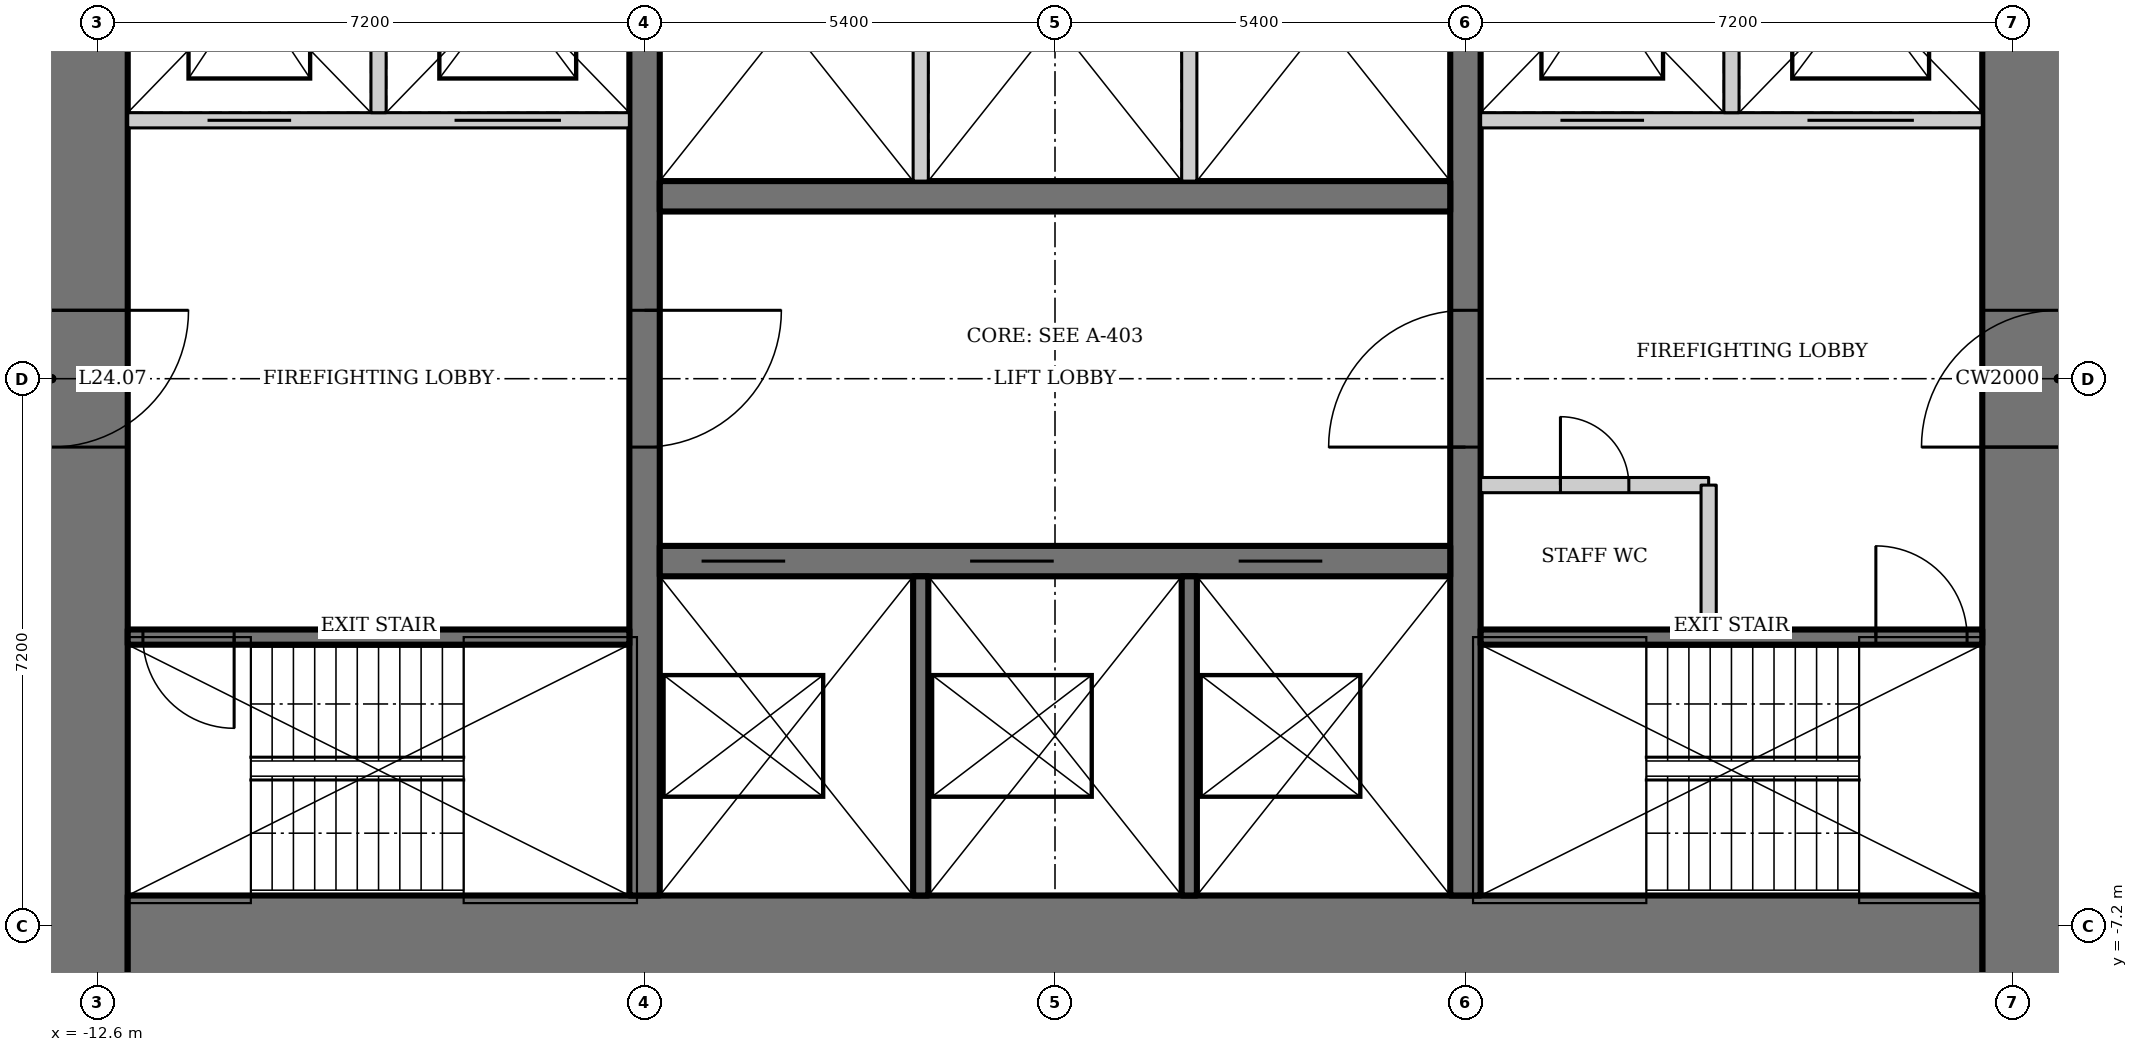
"""IFC4 building model, lengths in metres.
Left out: names, types, materials, properties, quantities, classifications, styles, units other than length and angle.
Written with IfcOpenShell. Run it as: python <this file> out.ifc"""

import sys

from ifc_helpers import new_model, si_unit, direction, frame, frame_2d, origin, place, context, subcontext, project, spatial, rectangle, extrude, element, fill, save


model = new_model("IFC4")
c1 = context("Model", 3, precision=1e-05, world=origin(), true_north=direction((0.0, 1.0)))
c2 = subcontext(c1, "Body", "Model", "MODEL_VIEW")
j1 = project(units=[si_unit("LENGTHUNIT", "METRE"), si_unit("PLANEANGLEUNIT", "RADIAN")], contexts=[c1])
p1 = place(None, origin())
s1 = spatial("IfcSite", under=j1, at=p1, CompositionType="ELEMENT")
p2 = place(p1, origin())
s2 = spatial("IfcBuilding", under=s1, at=p2, CompositionType="ELEMENT")
p3 = place(p2, frame((0.0, 0.0, 101.8)))
s3 = spatial("IfcBuildingStorey", under=s2, at=p3, CompositionType="ELEMENT", Elevation=101.8)
p4 = place(p3, frame((13.2, -13.0, 0.0), z_axis=(0.0, 0.0, 1.0), x_axis=(0.0, 1.0, 0.0)))
e1 = element("IfcWall", 1, at=p4, inside=s3, PredefinedType="SHEAR", context=c2, shape_type="SweptSolid", body=[
    extrude(rectangle(XDim=26.0, YDim=2.0, at=frame_2d((13.0, 0.0))), origin(), (0.0, 0.0, 1.0), 3.6),
])
p5 = place(p4, frame((12.1, 0.0, 0.0)))
e2 = element("IfcOpeningElement", 2, at=p5, cuts=e1, PredefinedType="OPENING", context=c2, shape_type="SweptSolid", body=[
    extrude(rectangle(XDim=1.8, YDim=2.1, at=frame_2d((0.9, 1.05))), frame((0.0, 1.01, 0.0), z_axis=(0.0, -1.0, 0.0), x_axis=(1.0, 0.0, 0.0)), (0.0, 0.0, 1.0), 2.02),
])
p6 = place(p3, frame((-13.2, 13.0, 0.0), z_axis=(0.0, 0.0, 1.0), x_axis=(0.0, -1.0, 0.0)))
e3 = element("IfcWall", 3, at=p6, inside=s3, PredefinedType="SHEAR", context=c2, shape_type="SweptSolid", body=[
    extrude(rectangle(XDim=26.0, YDim=2.0, at=frame_2d((13.0, 0.0))), origin(), (0.0, 0.0, 1.0), 3.6),
])
p7 = place(p6, frame((12.1, 0.0, 0.0)))
e4 = element("IfcOpeningElement", 4, at=p7, cuts=e3, PredefinedType="OPENING", context=c2, shape_type="SweptSolid", body=[
    extrude(rectangle(XDim=1.8, YDim=2.1, at=frame_2d((0.9, 1.05))), frame((0.0, 1.01, 0.0), z_axis=(0.0, -1.0, 0.0), x_axis=(1.0, 0.0, 0.0)), (0.0, 0.0, 1.0), 2.02),
])
p8 = place(p3, frame((-12.2, -8.0, 0.0), z_axis=(0.0, 0.0, 1.0), x_axis=(1.0, 0.0, 0.0)))
e5 = element("IfcWall", 5, at=p8, inside=s3, PredefinedType="SHEAR", context=c2, shape_type="SweptSolid", body=[
    extrude(rectangle(XDim=24.4, YDim=2.4, at=frame_2d((12.2, 0.0))), origin(), (0.0, 0.0, 1.0), 3.6),
])
p9 = place(p3, frame((5.4, -6.8, 0.0), z_axis=(0.0, 0.0, 1.0), x_axis=(0.0, 1.0, 0.0)))
e6 = element("IfcWall", 6, at=p9, inside=s3, PredefinedType="SHEAR", context=c2, shape_type="SweptSolid", body=[
    extrude(rectangle(XDim=13.6, YDim=0.4, at=frame_2d((6.8, 0.0))), origin(), (0.0, 0.0, 1.0), 3.6),
])
p10 = place(p9, frame((5.9, 0.0, 0.0)))
e7 = element("IfcOpeningElement", 7, at=p10, cuts=e6, PredefinedType="OPENING", context=c2, shape_type="SweptSolid", body=[
    extrude(rectangle(XDim=1.8, YDim=2.1, at=frame_2d((0.9, 1.05))), frame((0.0, 0.21, 0.0), z_axis=(0.0, -1.0, 0.0), x_axis=(1.0, 0.0, 0.0)), (0.0, 0.0, 1.0), 0.42),
])
p11 = place(p3, frame((-5.4, 6.8, 0.0), z_axis=(0.0, 0.0, 1.0), x_axis=(0.0, -1.0, 0.0)))
e8 = element("IfcWall", 8, at=p11, inside=s3, PredefinedType="SHEAR", context=c2, shape_type="SweptSolid", body=[
    extrude(rectangle(XDim=13.6, YDim=0.4, at=frame_2d((6.8, 0.0))), origin(), (0.0, 0.0, 1.0), 3.6),
])
p12 = place(p11, frame((5.9, 0.0, 0.0)))
e9 = element("IfcOpeningElement", 9, at=p12, cuts=e8, PredefinedType="OPENING", context=c2, shape_type="SweptSolid", body=[
    extrude(rectangle(XDim=1.8, YDim=2.1, at=frame_2d((0.9, 1.05))), frame((0.0, 0.21, 0.0), z_axis=(0.0, -1.0, 0.0), x_axis=(1.0, 0.0, 0.0)), (0.0, 0.0, 1.0), 0.42),
])
p13 = place(p3, frame((-5.2, -2.4, 0.0), z_axis=(0.0, 0.0, 1.0), x_axis=(1.0, 0.0, 0.0)))
e10 = element("IfcWall", 10, at=p13, inside=s3, PredefinedType="SHEAR", context=c2, shape_type="SweptSolid", body=[
    extrude(rectangle(XDim=10.4, YDim=0.4, at=frame_2d((5.2, 0.0))), origin(), (0.0, 0.0, 1.0), 3.6),
])
p14 = place(p13, frame((0.55, 0.0, 0.0)))
e11 = element("IfcOpeningElement", 11, at=p14, cuts=e10, PredefinedType="OPENING", context=c2, shape_type="SweptSolid", body=[
    extrude(rectangle(XDim=1.1, YDim=2.2, at=frame_2d((0.55, 1.1))), frame((0.0, 0.21, 0.0), z_axis=(0.0, -1.0, 0.0), x_axis=(1.0, 0.0, 0.0)), (0.0, 0.0, 1.0), 0.42),
])
p15 = place(p13, frame((4.083, 0.0, 0.0)))
e12 = element("IfcOpeningElement", 12, at=p15, cuts=e10, PredefinedType="OPENING", context=c2, shape_type="SweptSolid", body=[
    extrude(rectangle(XDim=1.1, YDim=2.2, at=frame_2d((0.55, 1.1))), frame((0.0, 0.21, 0.0), z_axis=(0.0, -1.0, 0.0), x_axis=(1.0, 0.0, 0.0)), (0.0, 0.0, 1.0), 0.42),
])
p16 = place(p13, frame((7.617, 0.0, 0.0)))
e13 = element("IfcOpeningElement", 13, at=p16, cuts=e10, PredefinedType="OPENING", context=c2, shape_type="SweptSolid", body=[
    extrude(rectangle(XDim=1.1, YDim=2.2, at=frame_2d((0.55, 1.1))), frame((0.0, 0.21, 0.0), z_axis=(0.0, -1.0, 0.0), x_axis=(1.0, 0.0, 0.0)), (0.0, 0.0, 1.0), 0.42),
])
for number, where, z_axis, x_axis in (
    (14, (-1.767, -2.6, 0.0), (0.0, 0.0, 1.0), (0.0, -1.0, 0.0)),
    (15, (1.767, -2.6, 0.0), (0.0, 0.0, 1.0), (0.0, -1.0, 0.0)),
):
    element("IfcWall", number, at=place(p3, frame(where, z_axis=z_axis, x_axis=x_axis)), inside=s3, PredefinedType="SOLIDWALL", context=c2, shape_type="SweptSolid", body=[
        extrude(rectangle(XDim=4.2, YDim=0.2, at=frame_2d((2.1, 0.0))), origin(), (0.0, 0.0, 1.0), 3.6),
    ])
p17 = place(p3, frame((5.2, 2.4, 0.0), z_axis=(0.0, 0.0, 1.0), x_axis=(-1.0, 0.0, 0.0)))
e16 = element("IfcWall", 16, at=p17, inside=s3, PredefinedType="SHEAR", context=c2, shape_type="SweptSolid", body=[
    extrude(rectangle(XDim=10.4, YDim=0.4, at=frame_2d((5.2, 0.0))), origin(), (0.0, 0.0, 1.0), 3.6),
])
for number, where, z_axis, x_axis in (
    (17, (-1.767, 2.6, 0.0), (0.0, 0.0, 1.0), (0.0, 1.0, 0.0)),
    (18, (1.767, 2.6, 0.0), (0.0, 0.0, 1.0), (0.0, 1.0, 0.0)),
):
    element("IfcWall", number, at=place(p3, frame(where, z_axis=z_axis, x_axis=x_axis)), inside=s3, PredefinedType="SOLIDWALL", context=c2, shape_type="SweptSolid", body=[
        extrude(rectangle(XDim=4.2, YDim=0.2, at=frame_2d((2.1, 0.0))), origin(), (0.0, 0.0, 1.0), 3.6),
    ])
p18 = place(p3, frame((5.6, -3.4, 0.0), z_axis=(0.0, 0.0, 1.0), x_axis=(1.0, 0.0, 0.0)))
e19 = element("IfcWall", 19, at=p18, inside=s3, PredefinedType="SHEAR", context=c2, shape_type="SweptSolid", body=[
    extrude(rectangle(XDim=6.6, YDim=0.2, at=frame_2d((3.3, 0.0))), origin(), (0.0, 0.0, 1.0), 3.6),
])
p19 = place(p18, frame((5.2, 0.0, 0.0)))
e20 = element("IfcOpeningElement", 20, at=p19, cuts=e19, PredefinedType="OPENING", context=c2, shape_type="SweptSolid", body=[
    extrude(rectangle(XDim=1.2, YDim=2.1, at=frame_2d((0.6, 1.05))), frame((0.0, 0.11, 0.0), z_axis=(0.0, -1.0, 0.0), x_axis=(1.0, 0.0, 0.0)), (0.0, 0.0, 1.0), 0.22),
])
p20 = place(p3, frame((12.2, 3.4, 0.0), z_axis=(0.0, 0.0, 1.0), x_axis=(-1.0, 0.0, 0.0)))
e21 = element("IfcWall", 21, at=p20, inside=s3, PredefinedType="SOLIDWALL", context=c2, shape_type="SweptSolid", body=[
    extrude(rectangle(XDim=6.6, YDim=0.2, at=frame_2d((3.3, 0.0))), origin(), (0.0, 0.0, 1.0), 3.6),
])
p21 = place(p20, frame((4.45, 0.0, 0.0)))
e22 = element("IfcOpeningElement", 22, at=p21, cuts=e21, PredefinedType="OPENING", context=c2, shape_type="SweptSolid", body=[
    extrude(rectangle(XDim=1.1, YDim=2.2, at=frame_2d((0.55, 1.1))), frame((0.0, 0.11, 0.0), z_axis=(0.0, -1.0, 0.0), x_axis=(1.0, 0.0, 0.0)), (0.0, 0.0, 1.0), 0.22),
])
p22 = place(p20, frame((0.9, 0.0, 0.0)))
e23 = element("IfcOpeningElement", 23, at=p22, cuts=e21, PredefinedType="OPENING", context=c2, shape_type="SweptSolid", body=[
    extrude(rectangle(XDim=1.4, YDim=2.2, at=frame_2d((0.7, 1.1))), frame((0.0, 0.11, 0.0), z_axis=(0.0, -1.0, 0.0), x_axis=(1.0, 0.0, 0.0)), (0.0, 0.0, 1.0), 0.22),
])
p23 = place(p3, frame((8.9, 3.5, 0.0), z_axis=(0.0, 0.0, 1.0), x_axis=(0.0, 1.0, 0.0)))
e24 = element("IfcWall", 24, at=p23, inside=s3, PredefinedType="SOLIDWALL", context=c2, shape_type="SweptSolid", body=[
    extrude(rectangle(XDim=3.3, YDim=0.2, at=frame_2d((1.65, 0.0))), origin(), (0.0, 0.0, 1.0), 3.6),
])
p24 = place(p3, frame((-5.6, -3.4, 0.0), z_axis=(0.0, 0.0, 1.0), x_axis=(-1.0, 0.0, 0.0)))
e25 = element("IfcWall", 25, at=p24, inside=s3, PredefinedType="SHEAR", context=c2, shape_type="SweptSolid", body=[
    extrude(rectangle(XDim=6.6, YDim=0.2, at=frame_2d((3.3, 0.0))), origin(), (0.0, 0.0, 1.0), 3.6),
])
p25 = place(p24, frame((5.2, 0.0, 0.0)))
e26 = element("IfcOpeningElement", 26, at=p25, cuts=e25, PredefinedType="OPENING", context=c2, shape_type="SweptSolid", body=[
    extrude(rectangle(XDim=1.2, YDim=2.1, at=frame_2d((0.6, 1.05))), frame((0.0, 0.11, 0.0), z_axis=(0.0, -1.0, 0.0), x_axis=(1.0, 0.0, 0.0)), (0.0, 0.0, 1.0), 0.22),
])
p26 = place(p3, frame((-12.2, 3.4, 0.0), z_axis=(0.0, 0.0, 1.0), x_axis=(1.0, 0.0, 0.0)))
e27 = element("IfcWall", 27, at=p26, inside=s3, PredefinedType="SOLIDWALL", context=c2, shape_type="SweptSolid", body=[
    extrude(rectangle(XDim=6.6, YDim=0.2, at=frame_2d((3.3, 0.0))), origin(), (0.0, 0.0, 1.0), 3.6),
])
p27 = place(p26, frame((1.05, 0.0, 0.0)))
e28 = element("IfcOpeningElement", 28, at=p27, cuts=e27, PredefinedType="OPENING", context=c2, shape_type="SweptSolid", body=[
    extrude(rectangle(XDim=1.1, YDim=2.2, at=frame_2d((0.55, 1.1))), frame((0.0, 0.11, 0.0), z_axis=(0.0, -1.0, 0.0), x_axis=(1.0, 0.0, 0.0)), (0.0, 0.0, 1.0), 0.22),
])
p28 = place(p26, frame((4.3, 0.0, 0.0)))
e29 = element("IfcOpeningElement", 29, at=p28, cuts=e27, PredefinedType="OPENING", context=c2, shape_type="SweptSolid", body=[
    extrude(rectangle(XDim=1.4, YDim=2.2, at=frame_2d((0.7, 1.1))), frame((0.0, 0.11, 0.0), z_axis=(0.0, -1.0, 0.0), x_axis=(1.0, 0.0, 0.0)), (0.0, 0.0, 1.0), 0.22),
])
p29 = place(p3, frame((-8.9, 3.5, 0.0), z_axis=(0.0, 0.0, 1.0), x_axis=(0.0, 1.0, 0.0)))
e30 = element("IfcWall", 30, at=p29, inside=s3, PredefinedType="SOLIDWALL", context=c2, shape_type="SweptSolid", body=[
    extrude(rectangle(XDim=3.3, YDim=0.2, at=frame_2d((1.65, 0.0))), origin(), (0.0, 0.0, 1.0), 3.6),
])
p30 = place(p3, frame((5.6, -1.4, 0.0), z_axis=(0.0, 0.0, 1.0), x_axis=(1.0, 0.0, 0.0)))
e31 = element("IfcWall", 31, at=p30, inside=s3, PredefinedType="SOLIDWALL", context=c2, shape_type="SweptSolid", body=[
    extrude(rectangle(XDim=3.0, YDim=0.2, at=frame_2d((1.5, 0.0))), origin(), (0.0, 0.0, 1.0), 3.4),
])
p31 = place(p30, frame((1.05, 0.0, 0.0)))
e32 = element("IfcOpeningElement", 32, at=p31, cuts=e31, PredefinedType="OPENING", context=c2, shape_type="SweptSolid", body=[
    extrude(rectangle(XDim=0.9, YDim=2.1, at=frame_2d((0.45, 1.05))), frame((0.0, 0.11, 0.0), z_axis=(0.0, -1.0, 0.0), x_axis=(1.0, 0.0, 0.0)), (0.0, 0.0, 1.0), 0.22),
])
p32 = place(p3, frame((8.6, -1.4, 0.0), z_axis=(0.0, 0.0, 1.0), x_axis=(0.0, -1.0, 0.0)))
e33 = element("IfcWall", 33, at=p32, inside=s3, PredefinedType="SOLIDWALL", context=c2, shape_type="SweptSolid", body=[
    extrude(rectangle(XDim=1.9, YDim=0.2, at=frame_2d((0.95, 0.0))), origin(), (0.0, 0.0, 1.0), 3.4),
])
p33 = place(p31, origin())
e34 = element("IfcDoor", 34, at=p33, inside=s3, OperationType="SINGLE_SWING_LEFT", PredefinedType="DOOR", context=c2, shape_type="SweptSolid", body=[
    extrude(rectangle(XDim=0.9, YDim=2.1, at=frame_2d((0.45, 1.05))), frame((0.0, 0.025, 0.0), z_axis=(0.0, -1.0, 0.0), x_axis=(1.0, 0.0, 0.0)), (0.0, 0.0, 1.0), 0.05),
])
fill(e32, e34)
p34 = place(p10, origin())
e35 = element("IfcDoor", 35, at=p34, inside=s3, OperationType="DOUBLE_DOOR_DOUBLE_SWING", PredefinedType="DOOR", context=c2, shape_type="SweptSolid", body=[
    extrude(rectangle(XDim=1.8, YDim=2.1, at=frame_2d((0.9, 1.05))), frame((0.0, 0.025, 0.0), z_axis=(0.0, -1.0, 0.0), x_axis=(1.0, 0.0, 0.0)), (0.0, 0.0, 1.0), 0.05),
])
fill(e7, e35)
p35 = place(p12, origin())
e36 = element("IfcDoor", 36, at=p35, inside=s3, OperationType="DOUBLE_DOOR_DOUBLE_SWING", PredefinedType="DOOR", context=c2, shape_type="SweptSolid", body=[
    extrude(rectangle(XDim=1.8, YDim=2.1, at=frame_2d((0.9, 1.05))), frame((0.0, 0.025, 0.0), z_axis=(0.0, -1.0, 0.0), x_axis=(1.0, 0.0, 0.0)), (0.0, 0.0, 1.0), 0.05),
])
fill(e9, e36)
p36 = place(p19, origin())
e37 = element("IfcDoor", 37, at=p36, inside=s3, OperationType="SINGLE_SWING_RIGHT", PredefinedType="DOOR", context=c2, shape_type="SweptSolid", body=[
    extrude(rectangle(XDim=1.2, YDim=2.1, at=frame_2d((0.6, 1.05))), frame((0.0, 0.025, 0.0), z_axis=(0.0, -1.0, 0.0), x_axis=(1.0, 0.0, 0.0)), (0.0, 0.0, 1.0), 0.05),
])
fill(e20, e37)
p37 = place(p25, origin())
e38 = element("IfcDoor", 38, at=p37, inside=s3, OperationType="SINGLE_SWING_RIGHT", PredefinedType="DOOR", context=c2, shape_type="SweptSolid", body=[
    extrude(rectangle(XDim=1.2, YDim=2.1, at=frame_2d((0.6, 1.05))), frame((0.0, 0.025, 0.0), z_axis=(0.0, -1.0, 0.0), x_axis=(1.0, 0.0, 0.0)), (0.0, 0.0, 1.0), 0.05),
])
fill(e26, e38)
p38 = place(p5, origin())
e39 = element("IfcDoor", 39, at=p38, inside=s3, OperationType="DOUBLE_DOOR_DOUBLE_SWING", PredefinedType="DOOR", context=c2, shape_type="SweptSolid", body=[
    extrude(rectangle(XDim=1.8, YDim=2.1, at=frame_2d((0.9, 1.05))), frame((0.0, 0.025, 0.0), z_axis=(0.0, -1.0, 0.0), x_axis=(1.0, 0.0, 0.0)), (0.0, 0.0, 1.0), 0.05),
])
fill(e2, e39)
p39 = place(p7, origin())
e40 = element("IfcDoor", 40, at=p39, inside=s3, OperationType="DOUBLE_DOOR_DOUBLE_SWING", PredefinedType="DOOR", context=c2, shape_type="SweptSolid", body=[
    extrude(rectangle(XDim=1.8, YDim=2.1, at=frame_2d((0.9, 1.05))), frame((0.0, 0.025, 0.0), z_axis=(0.0, -1.0, 0.0), x_axis=(1.0, 0.0, 0.0)), (0.0, 0.0, 1.0), 0.05),
])
fill(e4, e40)
p40 = place(p14, origin())
e41 = element("IfcDoor", 41, at=p40, inside=s3, OperationType="DOUBLE_DOOR_SLIDING", PredefinedType="DOOR", context=c2, shape_type="SweptSolid", body=[
    extrude(rectangle(XDim=1.1, YDim=2.2, at=frame_2d((0.55, 1.1))), frame((0.0, 0.025, 0.0), z_axis=(0.0, -1.0, 0.0), x_axis=(1.0, 0.0, 0.0)), (0.0, 0.0, 1.0), 0.05),
])
fill(e11, e41)
p41 = place(p15, origin())
e42 = element("IfcDoor", 42, at=p41, inside=s3, OperationType="DOUBLE_DOOR_SLIDING", PredefinedType="DOOR", context=c2, shape_type="SweptSolid", body=[
    extrude(rectangle(XDim=1.1, YDim=2.2, at=frame_2d((0.55, 1.1))), frame((0.0, 0.025, 0.0), z_axis=(0.0, -1.0, 0.0), x_axis=(1.0, 0.0, 0.0)), (0.0, 0.0, 1.0), 0.05),
])
fill(e12, e42)
p42 = place(p16, origin())
e43 = element("IfcDoor", 43, at=p42, inside=s3, OperationType="DOUBLE_DOOR_SLIDING", PredefinedType="DOOR", context=c2, shape_type="SweptSolid", body=[
    extrude(rectangle(XDim=1.1, YDim=2.2, at=frame_2d((0.55, 1.1))), frame((0.0, 0.025, 0.0), z_axis=(0.0, -1.0, 0.0), x_axis=(1.0, 0.0, 0.0)), (0.0, 0.0, 1.0), 0.05),
])
fill(e13, e43)
p43 = place(p27, origin())
e44 = element("IfcDoor", 44, at=p43, inside=s3, OperationType="DOUBLE_DOOR_SLIDING", PredefinedType="DOOR", context=c2, shape_type="SweptSolid", body=[
    extrude(rectangle(XDim=1.1, YDim=2.2, at=frame_2d((0.55, 1.1))), frame((0.0, 0.025, 0.0), z_axis=(0.0, -1.0, 0.0), x_axis=(1.0, 0.0, 0.0)), (0.0, 0.0, 1.0), 0.05),
])
fill(e28, e44)
p44 = place(p28, origin())
e45 = element("IfcDoor", 45, at=p44, inside=s3, OperationType="DOUBLE_DOOR_SLIDING", PredefinedType="DOOR", context=c2, shape_type="SweptSolid", body=[
    extrude(rectangle(XDim=1.4, YDim=2.2, at=frame_2d((0.7, 1.1))), frame((0.0, 0.025, 0.0), z_axis=(0.0, -1.0, 0.0), x_axis=(1.0, 0.0, 0.0)), (0.0, 0.0, 1.0), 0.05),
])
fill(e29, e45)
p45 = place(p21, origin())
e46 = element("IfcDoor", 46, at=p45, inside=s3, OperationType="DOUBLE_DOOR_SLIDING", PredefinedType="DOOR", context=c2, shape_type="SweptSolid", body=[
    extrude(rectangle(XDim=1.1, YDim=2.2, at=frame_2d((0.55, 1.1))), frame((0.0, 0.025, 0.0), z_axis=(0.0, -1.0, 0.0), x_axis=(1.0, 0.0, 0.0)), (0.0, 0.0, 1.0), 0.05),
])
fill(e22, e46)
p46 = place(p22, origin())
e47 = element("IfcDoor", 47, at=p46, inside=s3, OperationType="DOUBLE_DOOR_SLIDING", PredefinedType="DOOR", context=c2, shape_type="SweptSolid", body=[
    extrude(rectangle(XDim=1.4, YDim=2.2, at=frame_2d((0.7, 1.1))), frame((0.0, 0.025, 0.0), z_axis=(0.0, -1.0, 0.0), x_axis=(1.0, 0.0, 0.0)), (0.0, 0.0, 1.0), 0.05),
])
fill(e23, e47)
save(model, sys.argv[1])
